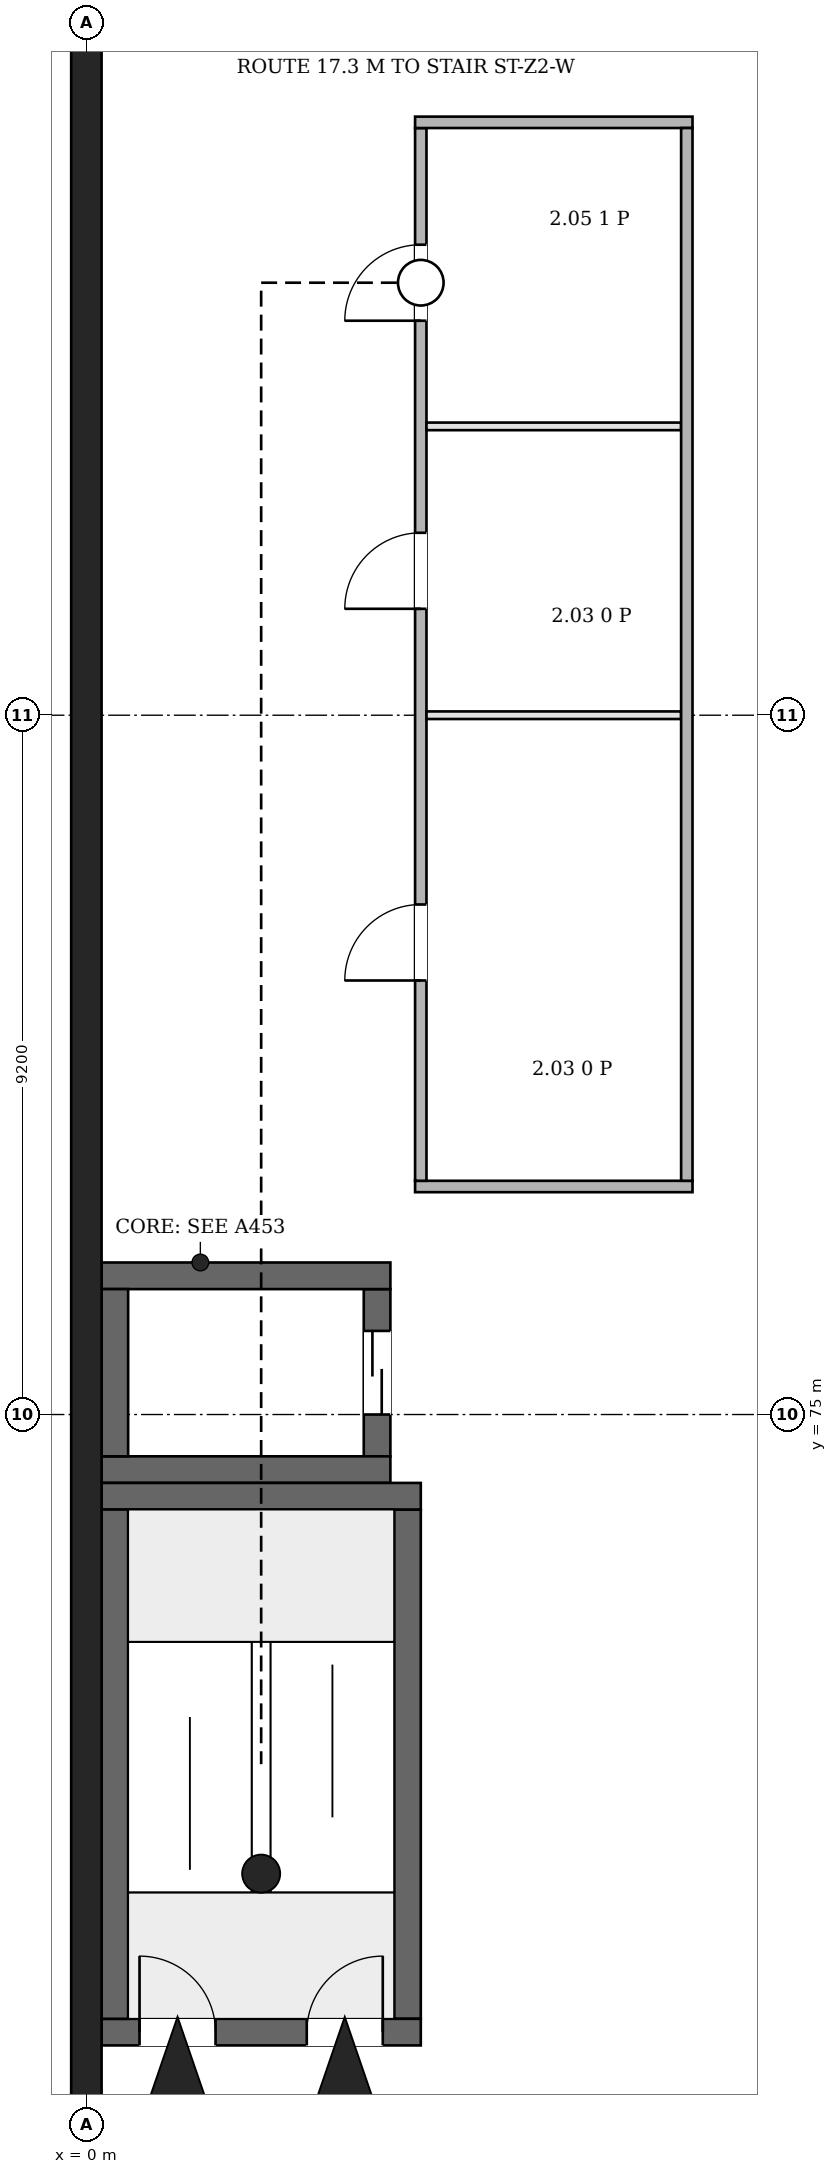
"""IFC4 building model, lengths in metres.
Left out: names, types, materials, properties, quantities, classifications, styles, units other than length and angle.
Written with IfcOpenShell. Run it as: python <this file> out.ifc"""

import sys

from ifc_helpers import new_model, si_unit, direction, frame, frame_2d, origin, place, context, subcontext, project, spatial, rectangle, extrude, element, fill, save


model = new_model("IFC4")
c1 = context("Model", 3, precision=1e-05, world=origin(), true_north=direction((0.0, 1.0)))
c2 = subcontext(c1, "Body", "Model", "MODEL_VIEW")
j1 = project(units=[si_unit("LENGTHUNIT", "METRE"), si_unit("PLANEANGLEUNIT", "RADIAN")], contexts=[c1])
p1 = place(None, origin())
s1 = spatial("IfcSite", under=j1, at=p1, CompositionType="ELEMENT")
p2 = place(p1, origin())
s2 = spatial("IfcBuilding", under=s1, at=p2, CompositionType="ELEMENT")
p3 = place(p2, frame((0.0, 0.0, 14.2)))
s3 = spatial("IfcBuildingStorey", under=s2, at=p3, CompositionType="ELEMENT", Elevation=14.2)
p4 = place(p3, frame((0.0, 46.72, 0.0), z_axis=(0.0, 0.0, 1.0), x_axis=(0.0, 1.0, 0.0)))
e1 = element("IfcWall", 1, at=p4, inside=s3, PredefinedType="SHEAR", context=c2, shape_type="SweptSolid", body=[
    extrude(rectangle(XDim=47.36, YDim=0.4, at=frame_2d((23.68, 0.0))), origin(), (0.0, 0.0, 1.0), 7.5),
])
p5 = place(p3, frame((0.2, 66.875, 0.0), z_axis=(0.0, 0.0, 1.0), x_axis=(1.0, 0.0, 0.0)))
e2 = element("IfcWall", 2, at=p5, inside=s3, PredefinedType="SHEAR", context=c2, shape_type="SweptSolid", body=[
    extrude(rectangle(XDim=4.2, YDim=0.35, at=frame_2d((2.1, 0.0))), origin(), (0.0, 0.0, 1.0), 7.5),
])
p6 = place(p5, frame((0.5, 0.0, 0.0)))
e3 = element("IfcOpeningElement", 3, at=p6, cuts=e2, PredefinedType="OPENING", context=c2, shape_type="SweptSolid", body=[
    extrude(rectangle(XDim=1.0, YDim=2.1, at=frame_2d((0.5, 1.05))), frame((0.0, 0.185, 0.0), z_axis=(0.0, -1.0, 0.0), x_axis=(1.0, 0.0, 0.0)), (0.0, 0.0, 1.0), 0.37),
])
p7 = place(p5, frame((2.7, 0.0, 0.0)))
e4 = element("IfcOpeningElement", 4, at=p7, cuts=e2, PredefinedType="OPENING", context=c2, shape_type="SweptSolid", body=[
    extrude(rectangle(XDim=1.0, YDim=2.1, at=frame_2d((0.5, 1.05))), frame((0.0, 0.185, 0.0), z_axis=(0.0, -1.0, 0.0), x_axis=(1.0, 0.0, 0.0)), (0.0, 0.0, 1.0), 0.37),
])
p8 = place(p3, frame((0.2, 73.925, 0.0), z_axis=(0.0, 0.0, 1.0), x_axis=(1.0, 0.0, 0.0)))
e5 = element("IfcWall", 5, at=p8, inside=s3, PredefinedType="SHEAR", context=c2, shape_type="SweptSolid", body=[
    extrude(rectangle(XDim=4.2, YDim=0.35, at=frame_2d((2.1, 0.0))), origin(), (0.0, 0.0, 1.0), 7.5),
])
for number, where, z_axis, x_axis in (
    (6, (0.375, 67.05, 0.0), (0.0, 0.0, 1.0), (0.0, 1.0, 0.0)),
    (7, (4.225, 67.05, 0.0), (0.0, 0.0, 1.0), (0.0, 1.0, 0.0)),
):
    element("IfcWall", number, at=place(p3, frame(where, z_axis=z_axis, x_axis=x_axis)), inside=s3, PredefinedType="SHEAR", context=c2, shape_type="SweptSolid", body=[
        extrude(rectangle(XDim=6.7, YDim=0.35, at=frame_2d((3.35, 0.0))), origin(), (0.0, 0.0, 1.0), 7.5),
    ])
for number, where, z_axis, x_axis in (
    (8, (0.2, 74.275, 0.0), (0.0, 0.0, 1.0), (1.0, 0.0, 0.0)),
    (9, (0.2, 76.825, 0.0), (0.0, 0.0, 1.0), (1.0, 0.0, 0.0)),
):
    element("IfcWall", number, at=place(p3, frame(where, z_axis=z_axis, x_axis=x_axis)), inside=s3, PredefinedType="SHEAR", context=c2, shape_type="SweptSolid", body=[
        extrude(rectangle(XDim=3.8, YDim=0.35, at=frame_2d((1.9, 0.0))), origin(), (0.0, 0.0, 1.0), 7.5),
    ])
p9 = place(p3, frame((0.375, 74.45, 0.0), z_axis=(0.0, 0.0, 1.0), x_axis=(0.0, 1.0, 0.0)))
e10 = element("IfcWall", 10, at=p9, inside=s3, PredefinedType="SHEAR", context=c2, shape_type="SweptSolid", body=[
    extrude(rectangle(XDim=2.2, YDim=0.35, at=frame_2d((1.1, 0.0))), origin(), (0.0, 0.0, 1.0), 7.5),
])
p10 = place(p3, frame((3.825, 74.45, 0.0), z_axis=(0.0, 0.0, 1.0), x_axis=(0.0, 1.0, 0.0)))
e11 = element("IfcWall", 11, at=p10, inside=s3, PredefinedType="SHEAR", context=c2, shape_type="SweptSolid", body=[
    extrude(rectangle(XDim=2.2, YDim=0.35, at=frame_2d((1.1, 0.0))), origin(), (0.0, 0.0, 1.0), 7.5),
])
p11 = place(p10, frame((0.55, 0.0, 0.0)))
e12 = element("IfcOpeningElement", 12, at=p11, cuts=e11, PredefinedType="OPENING", context=c2, shape_type="SweptSolid", body=[
    extrude(rectangle(XDim=1.1, YDim=2.1, at=frame_2d((0.55, 1.05))), frame((0.0, 0.185, 0.0), z_axis=(0.0, -1.0, 0.0), x_axis=(1.0, 0.0, 0.0)), (0.0, 0.0, 1.0), 0.37),
])
p12 = place(p3, frame((4.325, 78.0, 0.0), z_axis=(0.0, 0.0, 1.0), x_axis=(1.0, 0.0, 0.0)))
e13 = element("IfcWall", 13, at=p12, inside=s3, PredefinedType="PARTITIONING", context=c2, shape_type="SweptSolid", body=[
    extrude(rectangle(XDim=3.65, YDim=0.15, at=frame_2d((1.825, 0.0))), origin(), (0.0, 0.0, 1.0), 7.15),
])
p13 = place(p3, frame((4.4, 78.075, 0.0), z_axis=(0.0, 0.0, 1.0), x_axis=(0.0, 1.0, 0.0)))
e14 = element("IfcWall", 14, at=p13, inside=s3, PredefinedType="PARTITIONING", context=c2, shape_type="SweptSolid", body=[
    extrude(rectangle(XDim=13.85, YDim=0.15, at=frame_2d((6.925, 0.0))), origin(), (0.0, 0.0, 1.0), 7.15),
])
p14 = place(p13, frame((2.635, 0.0, 0.0)))
e15 = element("IfcOpeningElement", 15, at=p14, cuts=e14, PredefinedType="OPENING", context=c2, shape_type="SweptSolid", body=[
    extrude(rectangle(XDim=1.0, YDim=2.1, at=frame_2d((0.5, 1.05))), frame((0.0, 0.085, 0.0), z_axis=(0.0, -1.0, 0.0), x_axis=(1.0, 0.0, 0.0)), (0.0, 0.0, 1.0), 0.17),
])
p15 = place(p13, frame((7.525, 0.0, 0.0)))
e16 = element("IfcOpeningElement", 16, at=p15, cuts=e14, PredefinedType="OPENING", context=c2, shape_type="SweptSolid", body=[
    extrude(rectangle(XDim=1.0, YDim=2.1, at=frame_2d((0.5, 1.05))), frame((0.0, 0.085, 0.0), z_axis=(0.0, -1.0, 0.0), x_axis=(1.0, 0.0, 0.0)), (0.0, 0.0, 1.0), 0.17),
])
p16 = place(p13, frame((11.315, 0.0, 0.0)))
e17 = element("IfcOpeningElement", 17, at=p16, cuts=e14, PredefinedType="OPENING", context=c2, shape_type="SweptSolid", body=[
    extrude(rectangle(XDim=1.0, YDim=2.1, at=frame_2d((0.5, 1.05))), frame((0.0, 0.085, 0.0), z_axis=(0.0, -1.0, 0.0), x_axis=(1.0, 0.0, 0.0)), (0.0, 0.0, 1.0), 0.17),
])
p17 = place(p3, frame((4.325, 92.0, 0.0), z_axis=(0.0, 0.0, 1.0), x_axis=(1.0, 0.0, 0.0)))
e18 = element("IfcWall", 18, at=p17, inside=s3, PredefinedType="PARTITIONING", context=c2, shape_type="SweptSolid", body=[
    extrude(rectangle(XDim=3.65, YDim=0.15, at=frame_2d((1.825, 0.0))), origin(), (0.0, 0.0, 1.0), 7.15),
])
p18 = place(p3, frame((4.475, 84.2, 0.0), z_axis=(0.0, 0.0, 1.0), x_axis=(1.0, 0.0, 0.0)))
e19 = element("IfcWall", 19, at=p18, inside=s3, PredefinedType="PARTITIONING", context=c2, shape_type="SweptSolid", body=[
    extrude(rectangle(XDim=3.35, YDim=0.1, at=frame_2d((1.675, 0.0))), origin(), (0.0, 0.0, 1.0), 6.75),
])
p19 = place(p3, frame((4.475, 88.0, 0.0), z_axis=(0.0, 0.0, 1.0), x_axis=(1.0, 0.0, 0.0)))
e20 = element("IfcWall", 20, at=p19, inside=s3, PredefinedType="PARTITIONING", context=c2, shape_type="SweptSolid", body=[
    extrude(rectangle(XDim=3.35, YDim=0.1, at=frame_2d((1.675, 0.0))), origin(), (0.0, 0.0, 1.0), 7.15),
])
p20 = place(p3, frame((7.9, 78.075, 0.0), z_axis=(0.0, 0.0, 1.0), x_axis=(0.0, 1.0, 0.0)))
e21 = element("IfcWall", 21, at=p20, inside=s3, PredefinedType="PARTITIONING", context=c2, shape_type="SweptSolid", body=[
    extrude(rectangle(XDim=13.85, YDim=0.15, at=frame_2d((6.925, 0.0))), origin(), (0.0, 0.0, 1.0), 7.15),
])
p21 = place(p6, origin())
e22 = element("IfcDoor", 22, at=p21, inside=s3, OperationType="SINGLE_SWING_RIGHT", PredefinedType="DOOR", context=c2, shape_type="SweptSolid", body=[
    extrude(rectangle(XDim=1.0, YDim=2.1, at=frame_2d((0.5, 1.05))), frame((0.0, 0.025, 0.0), z_axis=(0.0, -1.0, 0.0), x_axis=(1.0, 0.0, 0.0)), (0.0, 0.0, 1.0), 0.05),
])
fill(e3, e22)
p22 = place(p7, origin())
e23 = element("IfcDoor", 23, at=p22, inside=s3, OperationType="SINGLE_SWING_LEFT", PredefinedType="DOOR", context=c2, shape_type="SweptSolid", body=[
    extrude(rectangle(XDim=1.0, YDim=2.1, at=frame_2d((0.5, 1.05))), frame((0.0, 0.025, 0.0), z_axis=(0.0, -1.0, 0.0), x_axis=(1.0, 0.0, 0.0)), (0.0, 0.0, 1.0), 0.05),
])
fill(e4, e23)
p23 = place(p11, origin())
e24 = element("IfcDoor", 24, at=p23, inside=s3, OperationType="DOUBLE_DOOR_SLIDING", PredefinedType="DOOR", context=c2, shape_type="SweptSolid", body=[
    extrude(rectangle(XDim=1.1, YDim=2.1, at=frame_2d((0.55, 1.05))), frame((0.0, 0.025, 0.0), z_axis=(0.0, -1.0, 0.0), x_axis=(1.0, 0.0, 0.0)), (0.0, 0.0, 1.0), 0.05),
])
fill(e12, e24)
p24 = place(p14, origin())
e25 = element("IfcDoor", 25, at=p24, inside=s3, OperationType="SINGLE_SWING_RIGHT", PredefinedType="DOOR", context=c2, shape_type="SweptSolid", body=[
    extrude(rectangle(XDim=1.0, YDim=2.1, at=frame_2d((0.5, 1.05))), frame((0.0, 0.025, 0.0), z_axis=(0.0, -1.0, 0.0), x_axis=(1.0, 0.0, 0.0)), (0.0, 0.0, 1.0), 0.05),
])
fill(e15, e25)
p25 = place(p15, origin())
e26 = element("IfcDoor", 26, at=p25, inside=s3, OperationType="SINGLE_SWING_LEFT", PredefinedType="DOOR", context=c2, shape_type="SweptSolid", body=[
    extrude(rectangle(XDim=1.0, YDim=2.1, at=frame_2d((0.5, 1.05))), frame((0.0, 0.025, 0.0), z_axis=(0.0, -1.0, 0.0), x_axis=(1.0, 0.0, 0.0)), (0.0, 0.0, 1.0), 0.05),
])
fill(e16, e26)
p26 = place(p16, origin())
e27 = element("IfcDoor", 27, at=p26, inside=s3, OperationType="SINGLE_SWING_LEFT", PredefinedType="DOOR", context=c2, shape_type="SweptSolid", body=[
    extrude(rectangle(XDim=1.0, YDim=2.1, at=frame_2d((0.5, 1.05))), frame((0.0, 0.025, 0.0), z_axis=(0.0, -1.0, 0.0), x_axis=(1.0, 0.0, 0.0)), (0.0, 0.0, 1.0), 0.05),
])
fill(e17, e27)
save(model, sys.argv[1])
